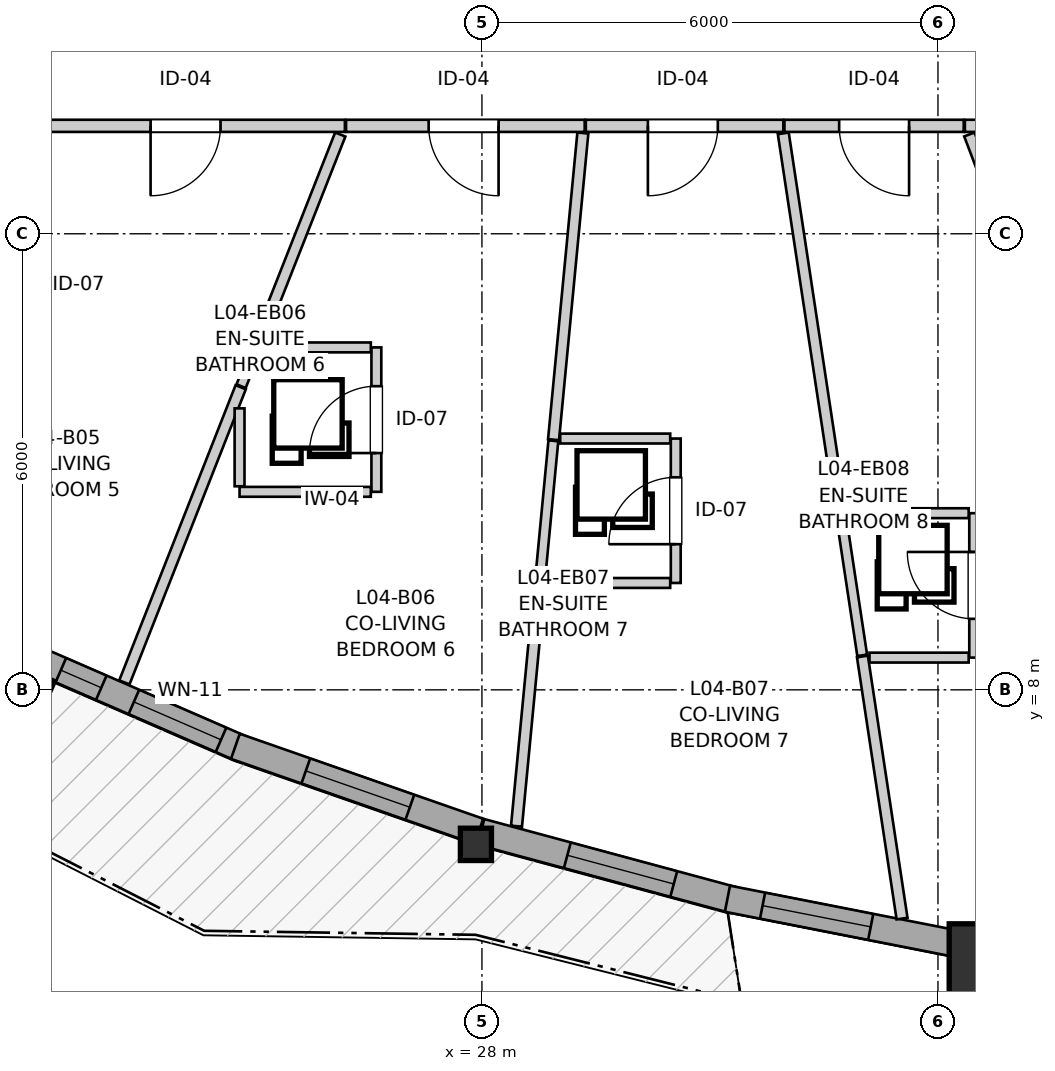
"""IFC4 building model, lengths in metres.
Left out: names, types, materials, properties, quantities, classifications, styles, units other than length and angle.
Written with IfcOpenShell. Run it as: python <this file> out.ifc"""

import sys

from ifc_helpers import new_model, si_unit, direction, frame, frame_2d, origin, origin_2d, place, context, subcontext, project, spatial, rectangle, i_section, extrude, source, transform, mapped, element, fill, save


model = new_model("IFC4")
c1 = context("Model", 3, precision=1e-05, world=origin(), true_north=direction((0.0, 1.0)))
c2 = subcontext(c1, "Body", "Model", "MODEL_VIEW")
j1 = project(units=[si_unit("LENGTHUNIT", "METRE"), si_unit("PLANEANGLEUNIT", "RADIAN")], contexts=[c1])
p1 = place(None, origin())
s1 = spatial("IfcSite", under=j1, at=p1, CompositionType="ELEMENT")
p2 = place(p1, origin())
s2 = spatial("IfcBuilding", under=s1, at=p2, CompositionType="ELEMENT")
p3 = place(p2, frame((0.0, 0.0, 17.4)))
s3 = spatial("IfcBuildingStorey", under=s2, at=p3, CompositionType="ELEMENT", Elevation=17.4)
m1 = source(origin(), c2, "Body", "SweptSolid", [
    extrude(i_section(OverallWidth=0.409, OverallDepth=0.425, WebThickness=0.03, FlangeThickness=0.048, FilletRadius=0.015, at=origin_2d()), origin(), (0.0, 0.0, 1.0), 2.94),
])
p4 = place(p3, frame((27.921, 5.967, 0.0), z_axis=(0.0, 0.0, 1.0), x_axis=(1.0, 0.0, 0.0)))
e1 = element("IfcColumn", 1, at=p4, inside=s3, PredefinedType="PILASTER", context=c2, shape_type="MappedRepresentation", body=[
    mapped(m1, transform((0.0, 0.0, 0.0), x_axis=(1.0, 0.0, 0.0), y_axis=(0.0, 1.0, 0.0), z_axis=(0.0, 0.0, 1.0), scale=1.0)),
])
m2 = source(origin(), c2, "Body", "SweptSolid", [
    extrude(rectangle(XDim=1.05, YDim=1.05, at=origin_2d()), origin(), (0.0, 0.0, 1.0), 2.94),
])
p5 = place(p3, frame((34.673, 4.397, 0.0), z_axis=(0.0, 0.0, 1.0), x_axis=(1.0, 0.0, 0.0)))
e2 = element("IfcColumn", 2, at=p5, inside=s3, PredefinedType="COLUMN", context=c2, shape_type="MappedRepresentation", body=[
    mapped(m2, transform((0.0, 0.0, 0.0), x_axis=(1.0, 0.0, 0.0), y_axis=(0.0, 1.0, 0.0), z_axis=(0.0, 0.0, 1.0), scale=1.0)),
])
p6 = place(p3, frame((22.018, 8.451, 0.0), z_axis=(0.0, 0.0, 1.0), x_axis=(0.917071318244, -0.398723208824, 0.0)))
e3 = element("IfcWall", 3, at=p6, inside=s3, PredefinedType="SOLIDWALL", context=c2, shape_type="SweptSolid", body=[
    extrude(rectangle(XDim=3.076, YDim=0.35, at=frame_2d((1.538, 0.0))), origin(), (0.0, 0.0, 1.0), 2.42),
])
p7 = place(p6, frame((0.481, 0.0, 0.82)))
e4 = element("IfcOpeningElement", 4, at=p7, cuts=e3, PredefinedType="OPENING", context=c2, shape_type="SweptSolid", body=[
    extrude(rectangle(XDim=0.58, YDim=1.35, at=frame_2d((0.29, 0.675))), frame((0.0, 0.185, 0.0), z_axis=(0.0, -1.0, 0.0), x_axis=(1.0, 0.0, 0.0)), (0.0, 0.0, 1.0), 0.37),
])
p8 = place(p6, frame((1.529, 0.0, 0.82)))
e5 = element("IfcOpeningElement", 5, at=p8, cuts=e3, PredefinedType="OPENING", context=c2, shape_type="SweptSolid", body=[
    extrude(rectangle(XDim=1.25, YDim=1.35, at=frame_2d((0.625, 0.675))), frame((0.0, 0.185, 0.0), z_axis=(0.0, -1.0, 0.0), x_axis=(1.0, 0.0, 0.0)), (0.0, 0.0, 1.0), 0.37),
])
p9 = place(p3, frame((24.756, 7.257, 0.0), z_axis=(0.0, 0.0, 1.0), x_axis=(0.944142925437, -0.329536244361, 0.0)))
e6 = element("IfcWall", 6, at=p9, inside=s3, PredefinedType="SOLIDWALL", context=c2, shape_type="SweptSolid", body=[
    extrude(rectangle(XDim=3.393, YDim=0.35, at=frame_2d((1.697, 0.0))), origin(), (0.0, 0.0, 1.0), 2.42),
])
p10 = place(p9, frame((0.982, 0.0, 0.82)))
e7 = element("IfcOpeningElement", 7, at=p10, cuts=e6, PredefinedType="OPENING", context=c2, shape_type="SweptSolid", body=[
    extrude(rectangle(XDim=1.45, YDim=1.25, at=frame_2d((0.725, 0.625))), frame((0.0, 0.185, 0.0), z_axis=(0.0, -1.0, 0.0), x_axis=(1.0, 0.0, 0.0)), (0.0, 0.0, 1.0), 0.37),
])
p11 = place(p3, frame((27.986, 6.131, 0.0), z_axis=(0.0, 0.0, 1.0), x_axis=(0.96546113776, -0.2605471003, 0.0)))
e8 = element("IfcWall", 8, at=p11, inside=s3, PredefinedType="SOLIDWALL", context=c2, shape_type="SweptSolid", body=[
    extrude(rectangle(XDim=3.449, YDim=0.35, at=frame_2d((1.725, 0.0))), origin(), (0.0, 0.0, 1.0), 2.42),
])
p12 = place(p11, frame((1.179, 0.0, 0.82)))
e9 = element("IfcOpeningElement", 9, at=p12, cuts=e8, PredefinedType="OPENING", context=c2, shape_type="SweptSolid", body=[
    extrude(rectangle(XDim=1.45, YDim=1.25, at=frame_2d((0.725, 0.625))), frame((0.0, 0.185, 0.0), z_axis=(0.0, -1.0, 0.0), x_axis=(1.0, 0.0, 0.0)), (0.0, 0.0, 1.0), 0.37),
])
p13 = place(p3, frame((31.23, 5.252, 0.0), z_axis=(0.0, 0.0, 1.0), x_axis=(0.981232542219, -0.192828156892, 0.0)))
e10 = element("IfcWall", 10, at=p13, inside=s3, PredefinedType="SOLIDWALL", context=c2, shape_type="SweptSolid", body=[
    extrude(rectangle(XDim=3.242, YDim=0.35, at=frame_2d((1.621, 0.0))), origin(), (0.0, 0.0, 1.0), 2.42),
])
p14 = place(p13, frame((0.471, 0.0, 0.82)))
e11 = element("IfcOpeningElement", 11, at=p14, cuts=e10, PredefinedType="OPENING", context=c2, shape_type="SweptSolid", body=[
    extrude(rectangle(XDim=1.45, YDim=1.25, at=frame_2d((0.725, 0.625))), frame((0.0, 0.185, 0.0), z_axis=(0.0, -1.0, 0.0), x_axis=(1.0, 0.0, 0.0)), (0.0, 0.0, 1.0), 0.37),
])
p15 = place(p3, frame((26.197, 15.42, 0.0), z_axis=(0.0, 0.0, 1.0), x_axis=(-1.0, 0.0, 0.0)))
e12 = element("IfcWall", 12, at=p15, inside=s3, PredefinedType="PARTITIONING", context=c2, shape_type="SweptSolid", body=[
    extrude(rectangle(XDim=4.177, YDim=0.16, at=frame_2d((2.088, 0.0))), origin(), (0.0, 0.0, 1.0), 2.94),
])
p16 = place(p15, frame((1.636, 0.0, 0.0)))
e13 = element("IfcOpeningElement", 13, at=p16, cuts=e12, PredefinedType="OPENING", context=c2, shape_type="SweptSolid", body=[
    extrude(rectangle(XDim=0.92, YDim=2.1, at=frame_2d((0.46, 1.05))), frame((0.0, 0.09, 0.0), z_axis=(0.0, -1.0, 0.0), x_axis=(1.0, 0.0, 0.0)), (0.0, 0.0, 1.0), 0.18),
])
p17 = place(p3, frame((29.352, 15.42, 0.0), z_axis=(0.0, 0.0, 1.0), x_axis=(-1.0, 0.0, 0.0)))
e14 = element("IfcWall", 14, at=p17, inside=s3, PredefinedType="PARTITIONING", context=c2, shape_type="SweptSolid", body=[
    extrude(rectangle(XDim=3.14, YDim=0.16, at=frame_2d((1.57, 0.0))), origin(), (0.0, 0.0, 1.0), 2.94),
])
p18 = place(p17, frame((1.133, 0.0, 0.0)))
e15 = element("IfcOpeningElement", 15, at=p18, cuts=e14, PredefinedType="OPENING", context=c2, shape_type="SweptSolid", body=[
    extrude(rectangle(XDim=0.92, YDim=2.1, at=frame_2d((0.46, 1.05))), frame((0.0, 0.09, 0.0), z_axis=(0.0, -1.0, 0.0), x_axis=(1.0, 0.0, 0.0)), (0.0, 0.0, 1.0), 0.18),
])
p19 = place(p3, frame((37.063, 15.42, 0.0), z_axis=(0.0, 0.0, 1.0), x_axis=(-1.0, 0.0, 0.0)))
e16 = element("IfcWall", 16, at=p19, inside=s3, PredefinedType="PARTITIONING", context=c2, shape_type="SweptSolid", body=[
    extrude(rectangle(XDim=2.709, YDim=0.16, at=frame_2d((1.354, 0.0))), origin(), (0.0, 0.0, 1.0), 2.94),
])
p20 = place(p19, frame((0.896, 0.0, 0.0)))
e17 = element("IfcOpeningElement", 17, at=p20, cuts=e16, PredefinedType="OPENING", context=c2, shape_type="SweptSolid", body=[
    extrude(rectangle(XDim=0.92, YDim=2.1, at=frame_2d((0.46, 1.05))), frame((0.0, 0.09, 0.0), z_axis=(0.0, -1.0, 0.0), x_axis=(1.0, 0.0, 0.0)), (0.0, 0.0, 1.0), 0.18),
])
p21 = place(p3, frame((31.965, 15.42, 0.0), z_axis=(0.0, 0.0, 1.0), x_axis=(-1.0, 0.0, 0.0)))
e18 = element("IfcWall", 18, at=p21, inside=s3, PredefinedType="PARTITIONING", context=c2, shape_type="SweptSolid", body=[
    extrude(rectangle(XDim=2.598, YDim=0.16, at=frame_2d((1.299, 0.0))), origin(), (0.0, 0.0, 1.0), 2.94),
])
p22 = place(p21, frame((0.862, 0.0, 0.0)))
e19 = element("IfcOpeningElement", 19, at=p22, cuts=e18, PredefinedType="OPENING", context=c2, shape_type="SweptSolid", body=[
    extrude(rectangle(XDim=0.92, YDim=2.1, at=frame_2d((0.46, 1.05))), frame((0.0, 0.09, 0.0), z_axis=(0.0, -1.0, 0.0), x_axis=(1.0, 0.0, 0.0)), (0.0, 0.0, 1.0), 0.18),
])
p23 = place(p3, frame((34.339, 15.42, 0.0), z_axis=(0.0, 0.0, 1.0), x_axis=(-1.0, 0.0, 0.0)))
e20 = element("IfcWall", 20, at=p23, inside=s3, PredefinedType="PARTITIONING", context=c2, shape_type="SweptSolid", body=[
    extrude(rectangle(XDim=2.359, YDim=0.16, at=frame_2d((1.18, 0.0))), origin(), (0.0, 0.0, 1.0), 2.94),
])
p24 = place(p23, frame((0.719, 0.0, 0.0)))
e21 = element("IfcOpeningElement", 21, at=p24, cuts=e20, PredefinedType="OPENING", context=c2, shape_type="SweptSolid", body=[
    extrude(rectangle(XDim=0.92, YDim=2.1, at=frame_2d((0.46, 1.05))), frame((0.0, 0.09, 0.0), z_axis=(0.0, -1.0, 0.0), x_axis=(1.0, 0.0, 0.0)), (0.0, 0.0, 1.0), 0.18),
])
p25 = place(p3, frame((26.611, 10.605, 0.0), z_axis=(0.0, 0.0, 1.0), x_axis=(0.0, 1.0, 0.0)))
e22 = element("IfcWall", 22, at=p25, inside=s3, PredefinedType="PARTITIONING", context=c2, shape_type="SweptSolid", body=[
    extrude(rectangle(XDim=1.9, YDim=0.13, at=frame_2d((0.95, 0.0))), origin(), (0.0, 0.0, 1.0), 2.94),
])
p26 = place(p25, frame((0.51, 0.0, 0.0)))
e23 = element("IfcOpeningElement", 23, at=p26, cuts=e22, PredefinedType="OPENING", context=c2, shape_type="SweptSolid", body=[
    extrude(rectangle(XDim=0.88, YDim=2.05, at=frame_2d((0.44, 1.025))), frame((0.0, 0.075, 0.0), z_axis=(0.0, -1.0, 0.0), x_axis=(1.0, 0.0, 0.0)), (0.0, 0.0, 1.0), 0.15),
])
p27 = place(p3, frame((34.477, 8.424, 0.0), z_axis=(0.0, 0.0, 1.0), x_axis=(0.0, 1.0, 0.0)))
e24 = element("IfcWall", 24, at=p27, inside=s3, PredefinedType="PARTITIONING", context=c2, shape_type="SweptSolid", body=[
    extrude(rectangle(XDim=1.9, YDim=0.13, at=frame_2d((0.95, 0.0))), origin(), (0.0, 0.0, 1.0), 2.94),
])
p28 = place(p27, frame((0.51, 0.0, 0.0)))
e25 = element("IfcOpeningElement", 25, at=p28, cuts=e24, PredefinedType="OPENING", context=c2, shape_type="SweptSolid", body=[
    extrude(rectangle(XDim=0.88, YDim=2.05, at=frame_2d((0.44, 1.025))), frame((0.0, 0.075, 0.0), z_axis=(0.0, -1.0, 0.0), x_axis=(1.0, 0.0, 0.0)), (0.0, 0.0, 1.0), 0.15),
])
p29 = place(p3, frame((30.55, 9.406, 0.0), z_axis=(0.0, 0.0, 1.0), x_axis=(0.0, 1.0, 0.0)))
e26 = element("IfcWall", 26, at=p29, inside=s3, PredefinedType="PARTITIONING", context=c2, shape_type="SweptSolid", body=[
    extrude(rectangle(XDim=1.9, YDim=0.13, at=frame_2d((0.95, 0.0))), origin(), (0.0, 0.0, 1.0), 2.94),
])
p30 = place(p29, frame((0.51, 0.0, 0.0)))
e27 = element("IfcOpeningElement", 27, at=p30, cuts=e26, PredefinedType="OPENING", context=c2, shape_type="SweptSolid", body=[
    extrude(rectangle(XDim=0.88, YDim=2.05, at=frame_2d((0.44, 1.025))), frame((0.0, 0.075, 0.0), z_axis=(0.0, -1.0, 0.0), x_axis=(1.0, 0.0, 0.0)), (0.0, 0.0, 1.0), 0.15),
])
p31 = place(p3, frame((34.413, 15.307, 0.0), z_axis=(0.0, 0.0, 1.0), x_axis=(0.355171610573, -0.934801116304, 0.0)))
e28 = element("IfcWall", 28, at=p31, inside=s3, PredefinedType="PARTITIONING", context=c2, shape_type="SweptSolid", body=[
    extrude(rectangle(XDim=5.177, YDim=0.145, at=frame_2d((2.589, 0.0))), origin(), (0.0, 0.0, 1.0), 2.94),
])
p32 = place(p3, frame((31.965, 15.321, 0.0), z_axis=(0.0, 0.0, 1.0), x_axis=(0.149541437001, -0.988755459464, 0.0)))
e29 = element("IfcWall", 29, at=p32, inside=s3, PredefinedType="PARTITIONING", context=c2, shape_type="SweptSolid", body=[
    extrude(rectangle(XDim=5.069, YDim=0.145, at=frame_2d((2.535, 0.0))), origin(), (0.0, 0.0, 1.0), 2.94),
])
p33 = place(p3, frame((23.295, 8.098, 0.0), z_axis=(0.0, 0.0, 1.0), x_axis=(0.366696366135, 0.930340676883, 0.0)))
e30 = element("IfcWall", 30, at=p33, inside=s3, PredefinedType="PARTITIONING", context=c2, shape_type="SweptSolid", body=[
    extrude(rectangle(XDim=4.174, YDim=0.145, at=frame_2d((2.087, 0.0))), origin(), (0.0, 0.0, 1.0), 2.94),
])
p34 = place(p3, frame((28.942, 11.291, 0.0), z_axis=(0.0, 0.0, 1.0), x_axis=(0.095244050973, 0.995453952101, 0.0)))
e31 = element("IfcWall", 31, at=p34, inside=s3, PredefinedType="PARTITIONING", context=c2, shape_type="SweptSolid", body=[
    extrude(rectangle(XDim=4.052, YDim=0.145, at=frame_2d((2.026, 0.0))), origin(), (0.0, 0.0, 1.0), 2.94),
])
p35 = place(p3, frame((33.006, 8.439, 0.0), z_axis=(0.0, 0.0, 1.0), x_axis=(0.149510938207, -0.988760071684, 0.0)))
e32 = element("IfcWall", 32, at=p35, inside=s3, PredefinedType="PARTITIONING", context=c2, shape_type="SweptSolid", body=[
    extrude(rectangle(XDim=3.488, YDim=0.145, at=frame_2d((1.744, 0.0))), origin(), (0.0, 0.0, 1.0), 2.94),
])
p36 = place(p3, frame((28.455, 6.206, 0.0), z_axis=(0.0, 0.0, 1.0), x_axis=(0.095101625286, 0.995467568968, 0.0)))
e33 = element("IfcWall", 33, at=p36, inside=s3, PredefinedType="PARTITIONING", context=c2, shape_type="SweptSolid", body=[
    extrude(rectangle(XDim=3.229, YDim=0.145, at=frame_2d((1.615, 0.0))), origin(), (0.0, 0.0, 1.0), 2.94),
])
p37 = place(p3, frame((25.026, 12.49, 0.0), z_axis=(0.0, 0.0, 1.0), x_axis=(0.366755134598, 0.930317510985, 0.0)))
e34 = element("IfcWall", 34, at=p37, inside=s3, PredefinedType="PARTITIONING", context=c2, shape_type="SweptSolid", body=[
    extrude(rectangle(XDim=3.027, YDim=0.145, at=frame_2d((1.513, 0.0))), origin(), (0.0, 0.0, 1.0), 2.94),
])
p38 = place(p3, frame((32.725, 10.294, 0.0), z_axis=(0.0, 0.0, 1.0), x_axis=(0.149533379282, -0.988756678096, 0.0)))
e35 = element("IfcWall", 35, at=p38, inside=s3, PredefinedType="PARTITIONING", context=c2, shape_type="SweptSolid", body=[
    extrude(rectangle(XDim=1.861, YDim=0.13, at=frame_2d((0.931, 0.0))), origin(), (0.0, 0.0, 1.0), 2.94),
])
p39 = place(p3, frame((28.764, 9.436, 0.0), z_axis=(0.0, 0.0, 1.0), x_axis=(0.094821557036, 0.995494285429, 0.0)))
e36 = element("IfcWall", 36, at=p39, inside=s3, PredefinedType="PARTITIONING", context=c2, shape_type="SweptSolid", body=[
    extrude(rectangle(XDim=1.849, YDim=0.13, at=frame_2d((0.924, 0.0))), origin(), (0.0, 0.0, 1.0), 2.94),
])
p40 = place(p3, frame((24.811, 10.605, 0.0), z_axis=(0.0, 0.0, 1.0), x_axis=(1.0, 0.0, 0.0)))
e37 = element("IfcWall", 37, at=p40, inside=s3, PredefinedType="PARTITIONING", context=c2, shape_type="SweptSolid", body=[
    extrude(rectangle(XDim=1.727, YDim=0.13, at=frame_2d((0.864, 0.0))), origin(), (0.0, 0.0, 1.0), 2.508),
])
p41 = place(p3, frame((28.848, 9.406, 0.0), z_axis=(0.0, 0.0, 1.0), x_axis=(1.0, 0.0, 0.0)))
e38 = element("IfcWall", 38, at=p41, inside=s3, PredefinedType="PARTITIONING", context=c2, shape_type="SweptSolid", body=[
    extrude(rectangle(XDim=1.629, YDim=0.13, at=frame_2d((0.814, 0.0))), origin(), (0.0, 0.0, 1.0), 2.508),
])
p42 = place(p3, frame((32.812, 10.324, 0.0), z_axis=(0.0, 0.0, 1.0), x_axis=(1.0, 0.0, 0.0)))
e39 = element("IfcWall", 39, at=p42, inside=s3, PredefinedType="PARTITIONING", context=c2, shape_type="SweptSolid", body=[
    extrude(rectangle(XDim=1.592, YDim=0.13, at=frame_2d((0.796, 0.0))), origin(), (0.0, 0.0, 1.0), 2.94),
])
p43 = place(p3, frame((29.03, 11.306, 0.0), z_axis=(0.0, 0.0, 1.0), x_axis=(1.0, 0.0, 0.0)))
e40 = element("IfcWall", 40, at=p43, inside=s3, PredefinedType="PARTITIONING", context=c2, shape_type="SweptSolid", body=[
    extrude(rectangle(XDim=1.447, YDim=0.13, at=frame_2d((0.724, 0.0))), origin(), (0.0, 0.0, 1.0), 2.94),
])
p44 = place(p3, frame((25.144, 12.505, 0.0), z_axis=(0.0, 0.0, 1.0), x_axis=(1.0, 0.0, 0.0)))
e41 = element("IfcWall", 41, at=p44, inside=s3, PredefinedType="PARTITIONING", context=c2, shape_type="SweptSolid", body=[
    extrude(rectangle(XDim=1.395, YDim=0.13, at=frame_2d((0.697, 0.0))), origin(), (0.0, 0.0, 1.0), 2.94),
])
p45 = place(p3, frame((33.099, 8.424, 0.0), z_axis=(0.0, 0.0, 1.0), x_axis=(1.0, 0.0, 0.0)))
e42 = element("IfcWall", 42, at=p45, inside=s3, PredefinedType="PARTITIONING", context=c2, shape_type="SweptSolid", body=[
    extrude(rectangle(XDim=1.305, YDim=0.13, at=frame_2d((0.652, 0.0))), origin(), (0.0, 0.0, 1.0), 2.508),
])
p46 = place(p3, frame((24.811, 10.678, 0.0), z_axis=(0.0, 0.0, 1.0), x_axis=(0.0, 1.0, 0.0)))
e43 = element("IfcWall", 43, at=p46, inside=s3, PredefinedType="PARTITIONING", context=c2, shape_type="SweptSolid", body=[
    extrude(rectangle(XDim=1.025, YDim=0.13, at=frame_2d((0.512, 0.0))), origin(), (0.0, 0.0, 1.0), 2.94),
])
p47 = place(p3, frame((24.831, 11.995, 0.0), z_axis=(0.0, 0.0, 1.0), x_axis=(0.366499739739, 0.93041815372, 0.0)))
e44 = element("IfcWall", 44, at=p47, inside=s3, PredefinedType="PARTITIONING", context=c2, shape_type="SweptSolid", body=[
    extrude(rectangle(XDim=0.517, YDim=0.13, at=frame_2d((0.258, 0.0))), origin(), (0.0, 0.0, 1.0), 2.94),
])
m3 = source(origin(), c2, "Body", "SweptSolid", [
    extrude(rectangle(XDim=0.58, YDim=1.35, at=frame_2d((0.29, 0.675))), frame((0.0, 0.03, 0.0), z_axis=(0.0, -1.0, 0.0), x_axis=(1.0, 0.0, 0.0)), (0.0, 0.0, 1.0), 0.06),
])
p48 = place(p7, origin())
e45 = element("IfcWindow", 45, at=p48, inside=s3, PartitioningType="SINGLE_PANEL", PredefinedType="WINDOW", context=c2, shape_type="MappedRepresentation", body=[
    mapped(m3, transform((0.0, 0.0, 0.0), x_axis=(1.0, 0.0, 0.0), y_axis=(0.0, 1.0, 0.0), z_axis=(0.0, 0.0, 1.0), scale=1.0)),
])
fill(e4, e45)
m4 = source(origin(), c2, "Body", "SweptSolid", [
    extrude(rectangle(XDim=1.25, YDim=1.35, at=frame_2d((0.625, 0.675))), frame((0.0, 0.03, 0.0), z_axis=(0.0, -1.0, 0.0), x_axis=(1.0, 0.0, 0.0)), (0.0, 0.0, 1.0), 0.06),
])
p49 = place(p8, origin())
e46 = element("IfcWindow", 46, at=p49, inside=s3, PartitioningType="SINGLE_PANEL", PredefinedType="WINDOW", context=c2, shape_type="MappedRepresentation", body=[
    mapped(m4, transform((0.0, 0.0, 0.0), x_axis=(1.0, 0.0, 0.0), y_axis=(0.0, 1.0, 0.0), z_axis=(0.0, 0.0, 1.0), scale=1.0)),
])
fill(e5, e46)
m5 = source(origin(), c2, "Body", "SweptSolid", [
    extrude(rectangle(XDim=1.45, YDim=1.25, at=frame_2d((0.725, 0.625))), frame((0.0, 0.03, 0.0), z_axis=(0.0, -1.0, 0.0), x_axis=(1.0, 0.0, 0.0)), (0.0, 0.0, 1.0), 0.06),
])
p50 = place(p10, origin())
e47 = element("IfcWindow", 47, at=p50, inside=s3, PartitioningType="SINGLE_PANEL", PredefinedType="WINDOW", context=c2, shape_type="MappedRepresentation", body=[
    mapped(m5, transform((0.0, 0.0, 0.0), x_axis=(1.0, 0.0, 0.0), y_axis=(0.0, 1.0, 0.0), z_axis=(0.0, 0.0, 1.0), scale=1.0)),
])
fill(e7, e47)
p51 = place(p12, origin())
e48 = element("IfcWindow", 48, at=p51, inside=s3, PartitioningType="SINGLE_PANEL", PredefinedType="WINDOW", context=c2, shape_type="MappedRepresentation", body=[
    mapped(m5, transform((0.0, 0.0, 0.0), x_axis=(1.0, 0.0, 0.0), y_axis=(0.0, 1.0, 0.0), z_axis=(0.0, 0.0, 1.0), scale=1.0)),
])
fill(e9, e48)
p52 = place(p14, origin())
e49 = element("IfcWindow", 49, at=p52, inside=s3, PartitioningType="SINGLE_PANEL", PredefinedType="WINDOW", context=c2, shape_type="MappedRepresentation", body=[
    mapped(m5, transform((0.0, 0.0, 0.0), x_axis=(1.0, 0.0, 0.0), y_axis=(0.0, 1.0, 0.0), z_axis=(0.0, 0.0, 1.0), scale=1.0)),
])
fill(e11, e49)
m6 = source(origin(), c2, "Body", "SweptSolid", [
    extrude(rectangle(XDim=0.92, YDim=2.1, at=frame_2d((0.46, 1.05))), frame((0.0, 0.025, 0.0), z_axis=(0.0, -1.0, 0.0), x_axis=(1.0, 0.0, 0.0)), (0.0, 0.0, 1.0), 0.05),
])
p53 = place(p16, origin())
e50 = element("IfcDoor", 50, at=p53, inside=s3, OperationType="SINGLE_SWING_RIGHT", PredefinedType="DOOR", context=c2, shape_type="MappedRepresentation", body=[
    mapped(m6, transform((0.0, 0.0, 0.0), x_axis=(1.0, 0.0, 0.0), y_axis=(0.0, 1.0, 0.0), z_axis=(0.0, 0.0, 1.0), scale=1.0)),
])
fill(e13, e50)
p54 = place(p18, origin())
e51 = element("IfcDoor", 51, at=p54, inside=s3, OperationType="SINGLE_SWING_LEFT", PredefinedType="DOOR", context=c2, shape_type="MappedRepresentation", body=[
    mapped(m6, transform((0.0, 0.0, 0.0), x_axis=(1.0, 0.0, 0.0), y_axis=(0.0, 1.0, 0.0), z_axis=(0.0, 0.0, 1.0), scale=1.0)),
])
fill(e15, e51)
p55 = place(p22, origin())
e52 = element("IfcDoor", 52, at=p55, inside=s3, OperationType="SINGLE_SWING_RIGHT", PredefinedType="DOOR", context=c2, shape_type="MappedRepresentation", body=[
    mapped(m6, transform((0.0, 0.0, 0.0), x_axis=(1.0, 0.0, 0.0), y_axis=(0.0, 1.0, 0.0), z_axis=(0.0, 0.0, 1.0), scale=1.0)),
])
fill(e19, e52)
p56 = place(p24, origin())
e53 = element("IfcDoor", 53, at=p56, inside=s3, OperationType="SINGLE_SWING_LEFT", PredefinedType="DOOR", context=c2, shape_type="MappedRepresentation", body=[
    mapped(m6, transform((0.0, 0.0, 0.0), x_axis=(1.0, 0.0, 0.0), y_axis=(0.0, 1.0, 0.0), z_axis=(0.0, 0.0, 1.0), scale=1.0)),
])
fill(e21, e53)
m7 = source(origin(), c2, "Body", "SweptSolid", [
    extrude(rectangle(XDim=0.88, YDim=2.05, at=frame_2d((0.44, 1.025))), frame((0.0, 0.025, 0.0), z_axis=(0.0, -1.0, 0.0), x_axis=(1.0, 0.0, 0.0)), (0.0, 0.0, 1.0), 0.05),
])
p57 = place(p26, origin())
e54 = element("IfcDoor", 54, at=p57, inside=s3, OperationType="SINGLE_SWING_LEFT", PredefinedType="DOOR", context=c2, shape_type="MappedRepresentation", body=[
    mapped(m7, transform((0.0, 0.0, 0.0), x_axis=(1.0, 0.0, 0.0), y_axis=(0.0, 1.0, 0.0), z_axis=(0.0, 0.0, 1.0), scale=1.0)),
])
fill(e23, e54)
p58 = place(p28, origin())
e55 = element("IfcDoor", 55, at=p58, inside=s3, OperationType="SINGLE_SWING_RIGHT", PredefinedType="DOOR", context=c2, shape_type="MappedRepresentation", body=[
    mapped(m7, transform((0.0, 0.0, 0.0), x_axis=(1.0, 0.0, 0.0), y_axis=(0.0, 1.0, 0.0), z_axis=(0.0, 0.0, 1.0), scale=1.0)),
])
fill(e25, e55)
p59 = place(p30, origin())
e56 = element("IfcDoor", 56, at=p59, inside=s3, OperationType="SINGLE_SWING_LEFT", PredefinedType="DOOR", context=c2, shape_type="MappedRepresentation", body=[
    mapped(m7, transform((0.0, 0.0, 0.0), x_axis=(1.0, 0.0, 0.0), y_axis=(0.0, 1.0, 0.0), z_axis=(0.0, 0.0, 1.0), scale=1.0)),
])
fill(e27, e56)
save(model, sys.argv[1])
